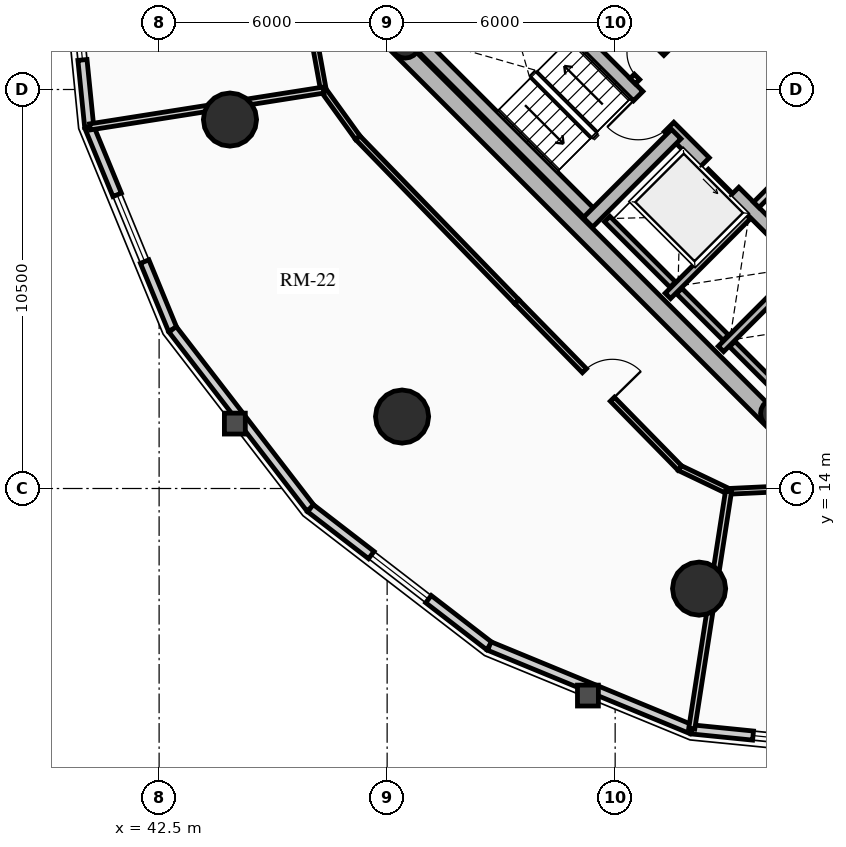
"""IFC4 building model, lengths in metres.
Left out: names, types, materials, properties, quantities, classifications, styles, units other than length and angle.
Written with IfcOpenShell. Run it as: python <this file> out.ifc"""

import sys

from ifc_helpers import new_model, si_unit, direction, frame, frame_2d, origin, origin_2d, place, context, subcontext, project, spatial, rectangle, circle, hollow_circle, extrude, source, transform, mapped, element, fill, save


model = new_model("IFC4")
c1 = context("Model", 3, precision=1e-05, world=origin(), true_north=direction((0.0, 1.0)))
c2 = subcontext(c1, "Body", "Model", "MODEL_VIEW")
j1 = project(units=[si_unit("LENGTHUNIT", "METRE"), si_unit("PLANEANGLEUNIT", "RADIAN")], contexts=[c1])
p1 = place(None, origin())
s1 = spatial("IfcSite", under=j1, at=p1, CompositionType="ELEMENT")
p2 = place(p1, origin())
s2 = spatial("IfcBuilding", under=s1, at=p2, CompositionType="ELEMENT")
p3 = place(p2, frame((0.0, 0.0, 70.15)))
s3 = spatial("IfcBuildingStorey", under=s2, at=p3, CompositionType="ELEMENT", Elevation=70.15)
for number, where, z_axis, x_axis in (
    (1, (58.737, 15.697, 0.0), (0.0, 0.0, 1.0), (-0.707, 0.707, 0.0)),
    (2, (66.303, 23.263, 0.0), (0.0, 0.0, 1.0), (-0.707, 0.707, 0.0)),
):
    element("IfcWall", number, at=place(p3, frame(where, z_axis=z_axis, x_axis=x_axis)), inside=s3, PredefinedType="SHEAR", context=c2, shape_type="SweptSolid", body=[
        extrude(rectangle(XDim=14.2, YDim=0.45, at=frame_2d((7.1, 0.0))), origin(), (0.0, 0.0, 1.0), 2.91),
    ])
p4 = place(p3, frame((58.578, 15.856, 0.0), z_axis=(0.0, 0.0, 1.0), x_axis=(0.707106781187, 0.707106781187, 0.0)))
e3 = element("IfcWall", 3, at=p4, inside=s3, PredefinedType="SHEAR", context=c2, shape_type="SweptSolid", body=[
    extrude(rectangle(XDim=10.7, YDim=0.45, at=frame_2d((5.35, 0.0))), origin(), (0.0, 0.0, 1.0), 2.91),
])
m1 = source(origin(), c2, "Body", "SweptSolid", [
    extrude(rectangle(XDim=1.5, YDim=2.02, at=frame_2d((0.75, 1.01))), frame((0.0, 0.235, 0.0), z_axis=(0.0, -1.0, 0.0), x_axis=(1.0, 0.0, 0.0)), (0.0, 0.0, 1.0), 0.47),
])
p5 = place(p4, frame((5.45, 0.0, 0.0)))
e4 = element("IfcOpeningElement", 4, at=p5, cuts=e3, PredefinedType="OPENING", context=c2, shape_type="MappedRepresentation", body=[
    mapped(m1, transform((0.0, 0.0, 0.0), x_axis=(1.0, 0.0, 0.0), y_axis=(0.0, 1.0, 0.0), z_axis=(0.0, 0.0, 1.0), scale=1.0)),
])
p6 = place(p3, frame((48.856, 25.578, 0.0), z_axis=(0.0, 0.0, 1.0), x_axis=(0.707106781187, 0.707106781187, 0.0)))
e5 = element("IfcWall", 5, at=p6, inside=s3, PredefinedType="SHEAR", context=c2, shape_type="SweptSolid", body=[
    extrude(rectangle(XDim=10.7, YDim=0.45, at=frame_2d((5.35, 0.0))), origin(), (0.0, 0.0, 1.0), 2.91),
])
p7 = place(p6, frame((4.6, 0.0, 0.0)))
e6 = element("IfcOpeningElement", 6, at=p7, cuts=e5, PredefinedType="OPENING", context=c2, shape_type="MappedRepresentation", body=[
    mapped(m1, transform((0.0, 0.0, 0.0), x_axis=(1.0, 0.0, 0.0), y_axis=(0.0, 1.0, 0.0), z_axis=(0.0, 0.0, 1.0), scale=1.0)),
])
p8 = place(p3, frame((61.078, 18.355, 0.0), z_axis=(0.0, 0.0, 1.0), x_axis=(-0.707106781187, 0.707106781187, 0.0)))
e7 = element("IfcWall", 7, at=p8, inside=s3, PredefinedType="SHEAR", context=c2, shape_type="SweptSolid", body=[
    extrude(rectangle(XDim=13.75, YDim=0.35, at=frame_2d((6.875, 0.0))), origin(), (0.0, 0.0, 1.0), 2.91),
])
m2 = source(origin(), c2, "Body", "SweptSolid", [
    extrude(rectangle(XDim=1.1, YDim=2.015, at=frame_2d((0.55, 1.007))), frame((0.0, 0.185, 0.0), z_axis=(0.0, -1.0, 0.0), x_axis=(1.0, 0.0, 0.0)), (0.0, 0.0, 1.0), 0.37),
])
p9 = place(p8, frame((4.875, 0.0, 0.0)))
e8 = element("IfcOpeningElement", 8, at=p9, cuts=e7, PredefinedType="OPENING", context=c2, shape_type="MappedRepresentation", body=[
    mapped(m2, transform((0.0, 0.0, 0.0), x_axis=(1.0, 0.0, 0.0), y_axis=(0.0, 1.0, 0.0), z_axis=(0.0, 0.0, 1.0), scale=1.0)),
])
m3 = source(origin(), c2, "Body", "SweptSolid", [
    extrude(rectangle(XDim=1.15, YDim=2.02, at=frame_2d((0.575, 1.01))), frame((0.0, 0.185, 0.0), z_axis=(0.0, -1.0, 0.0), x_axis=(1.0, 0.0, 0.0)), (0.0, 0.0, 1.0), 0.37),
])
p10 = place(p8, frame((7.295, 0.0, 0.0)))
e9 = element("IfcOpeningElement", 9, at=p10, cuts=e7, PredefinedType="OPENING", context=c2, shape_type="MappedRepresentation", body=[
    mapped(m3, transform((0.0, 0.0, 0.0), x_axis=(1.0, 0.0, 0.0), y_axis=(0.0, 1.0, 0.0), z_axis=(0.0, 0.0, 1.0), scale=1.0)),
])
p11 = place(p3, frame((63.645, 20.922, 0.0), z_axis=(0.0, 0.0, 1.0), x_axis=(-0.707106781187, 0.707106781187, 0.0)))
e10 = element("IfcWall", 10, at=p11, inside=s3, PredefinedType="SHEAR", context=c2, shape_type="SweptSolid", body=[
    extrude(rectangle(XDim=13.75, YDim=0.35, at=frame_2d((6.875, 0.0))), origin(), (0.0, 0.0, 1.0), 2.91),
])
p12 = place(p11, frame((10.0, 0.0, 0.0)))
e11 = element("IfcOpeningElement", 11, at=p12, cuts=e10, PredefinedType="OPENING", context=c2, shape_type="MappedRepresentation", body=[
    mapped(m2, transform((0.0, 0.0, 0.0), x_axis=(1.0, 0.0, 0.0), y_axis=(0.0, 1.0, 0.0), z_axis=(0.0, 0.0, 1.0), scale=1.0)),
])
p13 = place(p11, frame((12.0, 0.0, 0.0)))
e12 = element("IfcOpeningElement", 12, at=p13, cuts=e10, PredefinedType="OPENING", context=c2, shape_type="MappedRepresentation", body=[
    mapped(m2, transform((0.0, 0.0, 0.0), x_axis=(1.0, 0.0, 0.0), y_axis=(0.0, 1.0, 0.0), z_axis=(0.0, 0.0, 1.0), scale=1.0)),
])
p14 = place(p11, frame((5.305, 0.0, 0.0)))
e13 = element("IfcOpeningElement", 13, at=p14, cuts=e10, PredefinedType="OPENING", context=c2, shape_type="MappedRepresentation", body=[
    mapped(m3, transform((0.0, 0.0, 0.0), x_axis=(1.0, 0.0, 0.0), y_axis=(0.0, 1.0, 0.0), z_axis=(0.0, 0.0, 1.0), scale=1.0)),
])
p15 = place(p3, frame((53.922, 21.141, 0.0), z_axis=(0.0, 0.0, 1.0), x_axis=(-0.707088616009, 0.707124945897, 0.0)))
e14 = element("IfcWall", 14, at=p15, inside=s3, PredefinedType="SHEAR", context=c2, shape_type="SweptSolid", body=[
    extrude(rectangle(XDim=6.72, YDim=0.35, at=frame_2d((3.36, 0.0))), origin(), (0.0, 0.0, 1.0), 2.91),
])
p16 = place(p3, frame((53.784, 21.003, 0.0), z_axis=(0.0, 0.0, 1.0), x_axis=(0.707106781187, 0.707106781187, 0.0)))
e15 = element("IfcWall", 15, at=p16, inside=s3, PredefinedType="SHEAR", context=c2, shape_type="SweptSolid", body=[
    extrude(rectangle(XDim=3.285, YDim=0.35, at=frame_2d((1.643, 0.0))), origin(), (0.0, 0.0, 1.0), 2.91),
])
for number, where, z_axis, x_axis in (
    (16, (58.706, 15.976, 0.0), (0.0, 0.0, 1.0), (0.707, 0.707, 0.0)),
    (17, (48.976, 25.706, 0.0), (0.0, 0.0, 1.0), (0.707, 0.707, 0.0)),
):
    element("IfcColumn", number, at=place(p3, frame(where, z_axis=z_axis, x_axis=x_axis)), inside=s3, PredefinedType="COLUMN", context=c2, shape_type="SweptSolid", body=[
        extrude(hollow_circle(Radius=0.38, WallThickness=0.032, at=origin_2d()), origin(), (0.0, 0.0, 1.0), 2.91),
    ])
for number, where, z_axis, x_axis in (
    (18, (44.365, 23.709, 0.0), (0.0, 0.0, 1.0), (1.0, 0.0, 0.0)),
    (19, (48.893, 15.893, 0.0), (0.0, 0.0, 1.0), (1.0, 0.0, 0.0)),
    (20, (56.709, 11.365, 0.0), (0.0, 0.0, 1.0), (1.0, 0.0, 0.0)),
):
    element("IfcColumn", number, at=place(p3, frame(where, z_axis=z_axis, x_axis=x_axis)), inside=s3, PredefinedType="USERDEFINED", context=c2, shape_type="SweptSolid", body=[
        extrude(circle(Radius=0.7, at=origin_2d()), origin(), (0.0, 0.0, 1.0), 2.91),
    ])
p17 = place(p3, frame((40.661, 23.513, 0.0), z_axis=(0.0, 0.0, 1.0), x_axis=(-0.10015591906, 0.994971754311, 0.0)))
e21 = element("IfcWall", 21, at=p17, inside=s3, PredefinedType="SOLIDWALL", context=c2, shape_type="SweptSolid", body=[
    extrude(rectangle(XDim=5.448, YDim=0.24, at=frame_2d((2.724, 0.0))), origin(), (0.0, 0.0, 1.0), 2.179),
])
m4 = source(origin(), c2, "Body", "SweptSolid", [
    extrude(rectangle(XDim=1.9, YDim=1.35, at=frame_2d((0.95, 0.675))), frame((0.0, 0.13, 0.0), z_axis=(0.0, -1.0, 0.0), x_axis=(1.0, 0.0, 0.0)), (0.0, 0.0, 1.0), 0.26),
])
p18 = place(p17, frame((1.774, 0.0, 0.65)))
e22 = element("IfcOpeningElement", 22, at=p18, cuts=e21, PredefinedType="OPENING", context=c2, shape_type="MappedRepresentation", body=[
    mapped(m4, transform((0.0, 0.0, 0.0), x_axis=(1.0, 0.0, 0.0), y_axis=(0.0, 1.0, 0.0), z_axis=(0.0, 0.0, 1.0), scale=1.0)),
])
p19 = place(p3, frame((42.855, 18.189, 0.0), z_axis=(0.0, 0.0, 1.0), x_axis=(-0.381027003055, 0.924563909604, 0.0)))
e23 = element("IfcWall", 23, at=p19, inside=s3, PredefinedType="SOLIDWALL", context=c2, shape_type="SweptSolid", body=[
    extrude(rectangle(XDim=5.758, YDim=0.24, at=frame_2d((2.879, 0.0))), origin(), (0.0, 0.0, 1.0), 2.179),
])
p20 = place(p19, frame((1.929, 0.0, 0.65)))
e24 = element("IfcOpeningElement", 24, at=p20, cuts=e23, PredefinedType="OPENING", context=c2, shape_type="MappedRepresentation", body=[
    mapped(m4, transform((0.0, 0.0, 0.0), x_axis=(1.0, 0.0, 0.0), y_axis=(0.0, 1.0, 0.0), z_axis=(0.0, 0.0, 1.0), scale=1.0)),
])
p21 = place(p3, frame((46.483, 13.483, 0.0), z_axis=(0.0, 0.0, 1.0), x_axis=(-0.61054437102, 0.791982052206, 0.0)))
e25 = element("IfcWall", 25, at=p21, inside=s3, PredefinedType="SOLIDWALL", context=c2, shape_type="SweptSolid", body=[
    extrude(rectangle(XDim=5.942, YDim=0.24, at=frame_2d((2.971, 0.0))), origin(), (0.0, 0.0, 1.0), 2.179),
])
p22 = place(p3, frame((51.189, 9.855, 0.0), z_axis=(0.0, 0.0, 1.0), x_axis=(-0.791982052206, 0.61054437102, 0.0)))
e26 = element("IfcWall", 26, at=p22, inside=s3, PredefinedType="SOLIDWALL", context=c2, shape_type="SweptSolid", body=[
    extrude(rectangle(XDim=5.942, YDim=0.24, at=frame_2d((2.971, 0.0))), origin(), (0.0, 0.0, 1.0), 2.179),
])
p23 = place(p22, frame((2.021, 0.0, 0.65)))
e27 = element("IfcOpeningElement", 27, at=p23, cuts=e26, PredefinedType="OPENING", context=c2, shape_type="MappedRepresentation", body=[
    mapped(m4, transform((0.0, 0.0, 0.0), x_axis=(1.0, 0.0, 0.0), y_axis=(0.0, 1.0, 0.0), z_axis=(0.0, 0.0, 1.0), scale=1.0)),
])
p24 = place(p3, frame((56.513, 7.661, 0.0), z_axis=(0.0, 0.0, 1.0), x_axis=(-0.924563909604, 0.381027003055, 0.0)))
e28 = element("IfcWall", 28, at=p24, inside=s3, PredefinedType="SOLIDWALL", context=c2, shape_type="SweptSolid", body=[
    extrude(rectangle(XDim=5.758, YDim=0.24, at=frame_2d((2.879, 0.0))), origin(), (0.0, 0.0, 1.0), 2.179),
])
p25 = place(p3, frame((61.933, 7.115, 0.0), z_axis=(0.0, 0.0, 1.0), x_axis=(-0.994971754311, 0.10015591906, 0.0)))
e29 = element("IfcWall", 29, at=p25, inside=s3, PredefinedType="SOLIDWALL", context=c2, shape_type="SweptSolid", body=[
    extrude(rectangle(XDim=5.448, YDim=0.24, at=frame_2d((2.724, 0.0))), origin(), (0.0, 0.0, 1.0), 2.179),
])
m5 = source(origin(), c2, "Body", "SweptSolid", [
    extrude(rectangle(XDim=2.2, YDim=1.35, at=frame_2d((1.1, 0.675))), frame((0.0, 0.13, 0.0), z_axis=(0.0, -1.0, 0.0), x_axis=(1.0, 0.0, 0.0)), (0.0, 0.0, 1.0), 0.26),
])
p26 = place(p25, frame((1.624, 0.0, 0.65)))
e30 = element("IfcOpeningElement", 30, at=p26, cuts=e29, PredefinedType="OPENING", context=c2, shape_type="MappedRepresentation", body=[
    mapped(m5, transform((0.0, 0.0, 0.0), x_axis=(1.0, 0.0, 0.0), y_axis=(0.0, 1.0, 0.0), z_axis=(0.0, 0.0, 1.0), scale=1.0)),
])
p27 = place(p3, frame((55.888, 19.069, 0.0), z_axis=(0.0, 0.0, 1.0), x_axis=(0.707106781187, 0.707106781187, 0.0)))
e31 = element("IfcWall", 31, at=p27, inside=s3, PredefinedType="SHEAR", context=c2, shape_type="SweptSolid", body=[
    extrude(rectangle(XDim=2.97, YDim=0.2, at=frame_2d((1.485, 0.0))), origin(), (0.0, 0.0, 1.0), 2.91),
])
p28 = place(p3, frame((56.015, 19.366, 0.0), z_axis=(0.0, 0.0, 1.0), x_axis=(-0.707106781187, 0.707106781187, 0.0)))
e32 = element("IfcWall", 32, at=p28, inside=s3, PredefinedType="SHEAR", context=c2, shape_type="SweptSolid", body=[
    extrude(rectangle(XDim=2.44, YDim=0.2, at=frame_2d((1.22, 0.0))), origin(), (0.0, 0.0, 1.0), 2.91),
])
p29 = place(p3, frame((57.284, 17.673, 0.0), z_axis=(0.0, 0.0, 1.0), x_axis=(0.707147878904, 0.70706568108, 0.0)))
e33 = element("IfcWall", 33, at=p29, inside=s3, PredefinedType="SHEAR", context=c2, shape_type="SweptSolid", body=[
    extrude(rectangle(XDim=2.97, YDim=0.2, at=frame_2d((1.485, 0.0))), origin(), (0.0, 0.0, 1.0), 2.91),
])
p30 = place(p3, frame((57.412, 17.97, 0.0), z_axis=(0.0, 0.0, 1.0), x_axis=(-0.707106781187, 0.707106781187, 0.0)))
e34 = element("IfcWall", 34, at=p30, inside=s3, PredefinedType="SHEAR", context=c2, shape_type="SweptSolid", body=[
    extrude(rectangle(XDim=1.735, YDim=0.2, at=frame_2d((0.867, 0.0))), origin(), (0.0, 0.0, 1.0), 2.91),
])
p31 = place(p3, frame((58.737, 16.644, 0.0), z_axis=(0.0, 0.0, 1.0), x_axis=(-0.707032117043, 0.707181437447, 0.0)))
e35 = element("IfcWall", 35, at=p31, inside=s3, PredefinedType="SHEAR", context=c2, shape_type="SweptSolid", body=[
    extrude(rectangle(XDim=1.635, YDim=0.2, at=frame_2d((0.817, 0.0))), origin(), (0.0, 0.0, 1.0), 2.91),
])
p32 = place(p3, frame((58.214, 21.467, 0.0), z_axis=(0.0, 0.0, 1.0), x_axis=(0.707106781187, 0.707106781187, 0.0)))
e36 = element("IfcWall", 36, at=p32, inside=s3, PredefinedType="PARTITIONING", context=c2, shape_type="SweptSolid", body=[
    extrude(rectangle(XDim=3.28, YDim=0.2, at=frame_2d((1.64, 0.0))), origin(), (0.0, 0.0, 1.0), 2.655),
])
m6 = source(origin(), c2, "Body", "SweptSolid", [
    extrude(rectangle(XDim=1.5, YDim=2.02, at=frame_2d((0.75, 1.01))), frame((0.0, 0.11, 0.0), z_axis=(0.0, -1.0, 0.0), x_axis=(1.0, 0.0, 0.0)), (0.0, 0.0, 1.0), 0.22),
])
p33 = place(p32, frame((1.55, 0.0, 0.0)))
e37 = element("IfcOpeningElement", 37, at=p33, cuts=e36, PredefinedType="OPENING", context=c2, shape_type="MappedRepresentation", body=[
    mapped(m6, transform((0.0, 0.0, 0.0), x_axis=(1.0, 0.0, 0.0), y_axis=(0.0, 1.0, 0.0), z_axis=(0.0, 0.0, 1.0), scale=1.0)),
])
p34 = place(p3, frame((54.961, 24.719, 0.0), z_axis=(0.0, 0.0, 1.0), x_axis=(0.707106781187, 0.707106781187, 0.0)))
e38 = element("IfcWall", 38, at=p34, inside=s3, PredefinedType="PARTITIONING", context=c2, shape_type="SweptSolid", body=[
    extrude(rectangle(XDim=3.28, YDim=0.2, at=frame_2d((1.64, 0.0))), origin(), (0.0, 0.0, 1.0), 2.655),
])
m7 = source(origin(), c2, "Body", "SweptSolid", [
    extrude(rectangle(XDim=0.9, YDim=2.005, at=frame_2d((0.45, 1.002))), frame((0.0, 0.11, 0.0), z_axis=(0.0, -1.0, 0.0), x_axis=(1.0, 0.0, 0.0)), (0.0, 0.0, 1.0), 0.22),
])
p35 = place(p34, frame((0.16, 0.0, 0.0)))
e39 = element("IfcOpeningElement", 39, at=p35, cuts=e38, PredefinedType="OPENING", context=c2, shape_type="MappedRepresentation", body=[
    mapped(m7, transform((0.0, 0.0, 0.0), x_axis=(1.0, 0.0, 0.0), y_axis=(0.0, 1.0, 0.0), z_axis=(0.0, 0.0, 1.0), scale=1.0)),
])
p36 = place(p3, frame((46.576, 25.85, 0.0), z_axis=(0.0, 0.0, 1.0), x_axis=(0.178962865041, -0.983855829345, 0.0)))
e40 = element("IfcWall", 40, at=p36, inside=s3, PredefinedType="PARTITIONING", context=c2, shape_type="SweptSolid", body=[
    extrude(rectangle(XDim=1.387, YDim=0.15, at=frame_2d((0.694, 0.0))), origin(), (0.0, 0.0, 1.0), 2.225),
])
p37 = place(p3, frame((46.824, 24.485, 0.0), z_axis=(0.0, 0.0, 1.0), x_axis=(0.584890953925, -0.811111935565, 0.0)))
e41 = element("IfcWall", 41, at=p37, inside=s3, PredefinedType="PARTITIONING", context=c2, shape_type="SweptSolid", body=[
    extrude(rectangle(XDim=1.547, YDim=0.15, at=frame_2d((0.773, 0.0))), origin(), (0.0, 0.0, 1.0), 2.225),
])
p38 = place(p3, frame((47.729, 23.23, 0.0), z_axis=(0.0, 0.0, 1.0), x_axis=(0.696119834292, -0.717925606386, 0.0)))
e42 = element("IfcWall", 42, at=p38, inside=s3, PredefinedType="PARTITIONING", context=c2, shape_type="SweptSolid", body=[
    extrude(rectangle(XDim=6.012, YDim=0.15, at=frame_2d((3.006, 0.0))), origin(), (0.0, 0.0, 1.0), 2.655),
])
p39 = place(p3, frame((51.914, 18.914, 0.0), z_axis=(0.0, 0.0, 1.0), x_axis=(0.6999614951, -0.71418058317, 0.0)))
e43 = element("IfcWall", 43, at=p39, inside=s3, PredefinedType="PARTITIONING", context=c2, shape_type="SweptSolid", body=[
    extrude(rectangle(XDim=6.13, YDim=0.15, at=frame_2d((3.065, 0.0))), origin(), (0.0, 0.0, 1.0), 2.225),
])
m8 = source(origin(), c2, "Body", "SweptSolid", [
    extrude(rectangle(XDim=1.05, YDim=2.015, at=frame_2d((0.525, 1.007))), frame((0.0, 0.085, 0.0), z_axis=(0.0, -1.0, 0.0), x_axis=(1.0, 0.0, 0.0)), (0.0, 0.0, 1.0), 0.17),
])
p40 = place(p39, frame((2.54, 0.0, 0.0)))
e44 = element("IfcOpeningElement", 44, at=p40, cuts=e43, PredefinedType="OPENING", context=c2, shape_type="MappedRepresentation", body=[
    mapped(m8, transform((0.0, 0.0, 0.0), x_axis=(1.0, 0.0, 0.0), y_axis=(0.0, 1.0, 0.0), z_axis=(0.0, 0.0, 1.0), scale=1.0)),
])
p41 = place(p3, frame((56.204, 14.536, 0.0), z_axis=(0.0, 0.0, 1.0), x_axis=(0.902244982981, -0.431223828986, 0.0)))
e45 = element("IfcWall", 45, at=p41, inside=s3, PredefinedType="PARTITIONING", context=c2, shape_type="SweptSolid", body=[
    extrude(rectangle(XDim=1.417, YDim=0.15, at=frame_2d((0.708, 0.0))), origin(), (0.0, 0.0, 1.0), 2.225),
])
p42 = place(p3, frame((57.483, 13.925, 0.0), z_axis=(0.0, 0.0, 1.0), x_axis=(0.998884345706, 0.047223552414, 0.0)))
e46 = element("IfcWall", 46, at=p42, inside=s3, PredefinedType="PARTITIONING", context=c2, shape_type="SweptSolid", body=[
    extrude(rectangle(XDim=1.494, YDim=0.15, at=frame_2d((0.747, 0.0))), origin(), (0.0, 0.0, 1.0), 2.225),
])
p43 = place(p3, frame((46.824, 24.485, 0.0), z_axis=(0.0, 0.0, 1.0), x_axis=(-0.987794772558, -0.155760994179, 0.0)))
e47 = element("IfcWall", 47, at=p43, inside=s3, PredefinedType="PARTITIONING", context=c2, shape_type="SweptSolid", body=[
    extrude(rectangle(XDim=6.219, YDim=0.16, at=frame_2d((3.11, 0.0))), origin(), (0.0, 0.0, 1.0), 2.179),
])
p44 = place(p3, frame((57.483, 13.925, 0.0), z_axis=(0.0, 0.0, 1.0), x_axis=(-0.153035505395, -0.988220690984, 0.0)))
e48 = element("IfcWall", 48, at=p44, inside=s3, PredefinedType="PARTITIONING", context=c2, shape_type="SweptSolid", body=[
    extrude(rectangle(XDim=6.319, YDim=0.16, at=frame_2d((3.16, 0.0))), origin(), (0.0, 0.0, 1.0), 2.179),
])
m9 = source(origin(), c2, "Body", "SweptSolid", [
    extrude(rectangle(XDim=1.9, YDim=1.35, at=frame_2d((0.95, 0.675))), frame((0.0, 0.03, 0.0), z_axis=(0.0, -1.0, 0.0), x_axis=(1.0, 0.0, 0.0)), (0.0, 0.0, 1.0), 0.06),
])
p45 = place(p18, origin())
e49 = element("IfcWindow", 49, at=p45, inside=s3, PartitioningType="DOUBLE_PANEL_VERTICAL", PredefinedType="WINDOW", context=c2, shape_type="MappedRepresentation", body=[
    mapped(m9, transform((0.0, 0.0, 0.0), x_axis=(1.0, 0.0, 0.0), y_axis=(0.0, 1.0, 0.0), z_axis=(0.0, 0.0, 1.0), scale=1.0)),
])
fill(e22, e49)
p46 = place(p20, origin())
e50 = element("IfcWindow", 50, at=p46, inside=s3, PartitioningType="DOUBLE_PANEL_VERTICAL", PredefinedType="WINDOW", context=c2, shape_type="MappedRepresentation", body=[
    mapped(m9, transform((0.0, 0.0, 0.0), x_axis=(1.0, 0.0, 0.0), y_axis=(0.0, 1.0, 0.0), z_axis=(0.0, 0.0, 1.0), scale=1.0)),
])
fill(e24, e50)
p47 = place(p23, origin())
e51 = element("IfcWindow", 51, at=p47, inside=s3, PartitioningType="DOUBLE_PANEL_VERTICAL", PredefinedType="WINDOW", context=c2, shape_type="MappedRepresentation", body=[
    mapped(m9, transform((0.0, 0.0, 0.0), x_axis=(1.0, 0.0, 0.0), y_axis=(0.0, 1.0, 0.0), z_axis=(0.0, 0.0, 1.0), scale=1.0)),
])
fill(e27, e51)
m10 = source(origin(), c2, "Body", "SweptSolid", [
    extrude(rectangle(XDim=2.2, YDim=1.35, at=frame_2d((1.1, 0.675))), frame((0.0, 0.03, 0.0), z_axis=(0.0, -1.0, 0.0), x_axis=(1.0, 0.0, 0.0)), (0.0, 0.0, 1.0), 0.06),
])
p48 = place(p26, origin())
e52 = element("IfcWindow", 52, at=p48, inside=s3, PartitioningType="DOUBLE_PANEL_VERTICAL", PredefinedType="WINDOW", context=c2, shape_type="MappedRepresentation", body=[
    mapped(m10, transform((0.0, 0.0, 0.0), x_axis=(1.0, 0.0, 0.0), y_axis=(0.0, 1.0, 0.0), z_axis=(0.0, 0.0, 1.0), scale=1.0)),
])
fill(e30, e52)
m11 = source(origin(), c2, "Body", "SweptSolid", [
    extrude(rectangle(XDim=1.1, YDim=2.015, at=frame_2d((0.55, 1.007))), frame((0.0, 0.025, 0.0), z_axis=(0.0, -1.0, 0.0), x_axis=(1.0, 0.0, 0.0)), (0.0, 0.0, 1.0), 0.05),
])
p49 = place(p9, origin())
e53 = element("IfcDoor", 53, at=p49, inside=s3, OperationType="SLIDING_TO_LEFT", PredefinedType="DOOR", context=c2, shape_type="MappedRepresentation", body=[
    mapped(m11, transform((0.0, 0.0, 0.0), x_axis=(1.0, 0.0, 0.0), y_axis=(0.0, 1.0, 0.0), z_axis=(0.0, 0.0, 1.0), scale=1.0)),
])
fill(e8, e53)
m12 = source(origin(), c2, "Body", "SweptSolid", [
    extrude(rectangle(XDim=1.15, YDim=2.02, at=frame_2d((0.575, 1.01))), frame((0.0, 0.025, 0.0), z_axis=(0.0, -1.0, 0.0), x_axis=(1.0, 0.0, 0.0)), (0.0, 0.0, 1.0), 0.05),
])
p50 = place(p10, origin())
e54 = element("IfcDoor", 54, at=p50, inside=s3, OperationType="SINGLE_SWING_RIGHT", PredefinedType="DOOR", context=c2, shape_type="MappedRepresentation", body=[
    mapped(m12, transform((0.0, 0.0, 0.0), x_axis=(1.0, 0.0, 0.0), y_axis=(0.0, 1.0, 0.0), z_axis=(0.0, 0.0, 1.0), scale=1.0)),
])
fill(e9, e54)
m13 = source(origin(), c2, "Body", "SweptSolid", [
    extrude(rectangle(XDim=0.9, YDim=2.005, at=frame_2d((0.45, 1.002))), frame((0.0, 0.025, 0.0), z_axis=(0.0, -1.0, 0.0), x_axis=(1.0, 0.0, 0.0)), (0.0, 0.0, 1.0), 0.05),
])
p51 = place(p35, origin())
e55 = element("IfcDoor", 55, at=p51, inside=s3, OperationType="SINGLE_SWING_RIGHT", PredefinedType="DOOR", context=c2, shape_type="MappedRepresentation", body=[
    mapped(m13, transform((0.0, 0.0, 0.0), x_axis=(1.0, 0.0, 0.0), y_axis=(0.0, 1.0, 0.0), z_axis=(0.0, 0.0, 1.0), scale=1.0)),
])
fill(e39, e55)
m14 = source(origin(), c2, "Body", "SweptSolid", [
    extrude(rectangle(XDim=1.05, YDim=2.015, at=frame_2d((0.525, 1.007))), frame((0.0, 0.025, 0.0), z_axis=(0.0, -1.0, 0.0), x_axis=(1.0, 0.0, 0.0)), (0.0, 0.0, 1.0), 0.05),
])
p52 = place(p40, origin())
e56 = element("IfcDoor", 56, at=p52, inside=s3, OperationType="SINGLE_SWING_RIGHT", PredefinedType="DOOR", context=c2, shape_type="MappedRepresentation", body=[
    mapped(m14, transform((0.0, 0.0, 0.0), x_axis=(1.0, 0.0, 0.0), y_axis=(0.0, 1.0, 0.0), z_axis=(0.0, 0.0, 1.0), scale=1.0)),
])
fill(e44, e56)
save(model, sys.argv[1])
